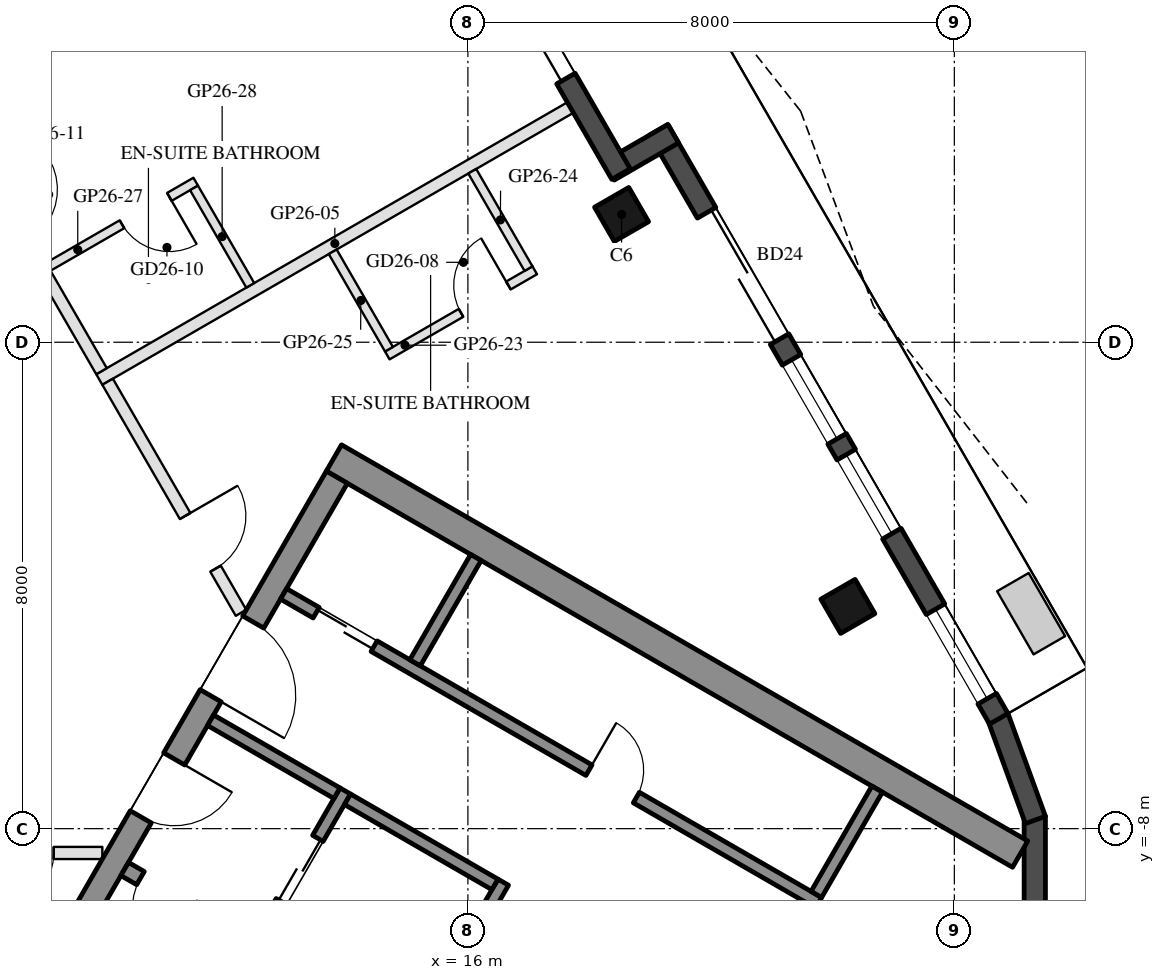
"""IFC4 building model, lengths in metres.
Left out: names, types, materials, properties, quantities, classifications, styles, units other than length and angle.
Written with IfcOpenShell. Run it as: python <this file> out.ifc"""

import sys

from ifc_helpers import new_model, si_unit, direction, frame, frame_2d, origin, origin_2d, place, context, subcontext, project, spatial, rectangle, hollow_rectangle, extrude, boolean, halfspace, element, fill, save


model = new_model("IFC4")
c1 = context("Model", 3, precision=1e-05, world=origin(), true_north=direction((0.0, 1.0)))
c2 = subcontext(c1, "Body", "Model", "MODEL_VIEW")
j1 = project(units=[si_unit("LENGTHUNIT", "METRE"), si_unit("PLANEANGLEUNIT", "RADIAN")], contexts=[c1])
p1 = place(None, origin())
s1 = spatial("IfcSite", under=j1, at=p1, CompositionType="ELEMENT")
p2 = place(p1, origin())
s2 = spatial("IfcBuilding", under=s1, at=p2, CompositionType="ELEMENT")
p3 = place(p2, frame((0.0, 0.0, 272.6)))
s3 = spatial("IfcBuildingStorey", under=s2, at=p3, CompositionType="ELEMENT", Elevation=272.6)
p4 = place(p3, frame((22.249, -4.345, 0.0), z_axis=(0.0, 0.0, 1.0), x_axis=(-0.5, 0.866025403784, 0.0)))
e1 = element("IfcColumn", 1, at=p4, inside=s3, PredefinedType="COLUMN", context=c2, shape_type="SweptSolid", body=[
    boolean("DIFFERENCE", extrude(hollow_rectangle(XDim=0.65, YDim=0.65, WallThickness=0.03, at=origin_2d()), origin(), (0.0, 0.0, 1.0), 3.7), halfspace(frame((0.0, 0.0, 3.653), z_axis=(0.0, 0.0, 1.0), x_axis=(1.0, 0.0, 0.0)), False)),
])
p5 = place(p3, frame((18.527, 2.102, 0.0), z_axis=(0.0, 0.0, 1.0), x_axis=(-0.5, 0.866025403784, 0.0)))
e2 = element("IfcColumn", 2, at=p5, inside=s3, PredefinedType="COLUMN", context=c2, shape_type="SweptSolid", body=[
    boolean("DIFFERENCE", extrude(hollow_rectangle(XDim=0.65, YDim=0.65, WallThickness=0.03, at=origin_2d()), origin(), (0.0, 0.0, 1.0), 3.7), halfspace(frame((0.0, 0.0, 3.66), z_axis=(0.0, 0.0, 1.0), x_axis=(1.0, 0.0, 0.0)), False)),
])
p6 = place(p3, frame((25.323, -9.597, 0.0), z_axis=(0.0, 0.0, 1.0), x_axis=(0.0, 1.0, 0.0)))
e3 = element("IfcWall", 3, at=p6, inside=s3, PredefinedType="SOLIDWALL", context=c2, shape_type="SweptSolid", body=[
    extrude(rectangle(XDim=1.8, YDim=0.35, at=frame_2d((0.9, 0.0))), origin(), (0.0, 0.0, 1.0), 3.55),
])
p7 = place(p3, frame((25.333, -7.857, 0.0), z_axis=(0.0, 0.0, 1.0), x_axis=(-0.34206975284, 0.939674562916, 0.0)))
e4 = element("IfcWall", 4, at=p7, inside=s3, PredefinedType="SOLIDWALL", context=c2, shape_type="SweptSolid", body=[
    extrude(rectangle(XDim=1.8, YDim=0.35, at=frame_2d((0.9, 0.0))), origin(), (0.0, 0.0, 1.0), 3.55),
])
p8 = place(p3, frame((24.731, -6.193, 0.0), z_axis=(0.0, 0.0, 1.0), x_axis=(-0.500007749075, 0.866020929808, 0.0)))
e5 = element("IfcWall", 5, at=p8, inside=s3, PredefinedType="SOLIDWALL", context=c2, shape_type="SweptSolid", body=[
    extrude(rectangle(XDim=11.185, YDim=0.35, at=frame_2d((5.593, 0.0))), origin(), (0.0, 0.0, 1.0), 3.55),
])
p9 = place(p8, frame((0.381, 0.0, 0.3)))
e6 = element("IfcOpeningElement", 6, at=p9, cuts=e5, PredefinedType="OPENING", context=c2, shape_type="SweptSolid", body=[
    extrude(rectangle(XDim=1.7, YDim=2.65, at=frame_2d((0.85, 1.325))), frame((0.0, 0.185, 0.0), z_axis=(0.0, -1.0, 0.0), x_axis=(1.0, 0.0, 0.0)), (0.0, 0.0, 1.0), 0.37),
])
p10 = place(p8, frame((7.21, 0.0, 0.0)))
e7 = element("IfcOpeningElement", 7, at=p10, cuts=e5, PredefinedType="OPENING", context=c2, shape_type="SweptSolid", body=[
    extrude(rectangle(XDim=2.4, YDim=2.4, at=frame_2d((1.2, 1.2))), frame((0.0, 0.185, 0.0), z_axis=(0.0, -1.0, 0.0), x_axis=(1.0, 0.0, 0.0)), (0.0, 0.0, 1.0), 0.37),
])
p11 = place(p8, frame((3.517, 0.0, 0.3)))
e8 = element("IfcOpeningElement", 8, at=p11, cuts=e5, PredefinedType="OPENING", context=c2, shape_type="SweptSolid", body=[
    extrude(rectangle(XDim=1.5, YDim=2.65, at=frame_2d((0.75, 1.325))), frame((0.0, 0.185, 0.0), z_axis=(0.0, -1.0, 0.0), x_axis=(1.0, 0.0, 0.0)), (0.0, 0.0, 1.0), 0.37),
])
p12 = place(p8, frame((5.317, 0.0, 0.3)))
e9 = element("IfcOpeningElement", 9, at=p12, cuts=e5, PredefinedType="OPENING", context=c2, shape_type="SweptSolid", body=[
    extrude(rectangle(XDim=1.5, YDim=2.65, at=frame_2d((0.75, 1.325))), frame((0.0, 0.185, 0.0), z_axis=(0.0, -1.0, 0.0), x_axis=(1.0, 0.0, 0.0)), (0.0, 0.0, 1.0), 0.37),
])
p13 = place(p3, frame((19.377, 3.429, 0.0), z_axis=(0.0, 0.0, 1.0), x_axis=(-0.866092288191, -0.499884134912, 0.0)))
e10 = element("IfcWall", 10, at=p13, inside=s3, PredefinedType="SOLIDWALL", context=c2, shape_type="SweptSolid", body=[
    extrude(rectangle(XDim=1.22, YDim=0.35, at=frame_2d((0.61, 0.0))), origin(), (0.0, 0.0, 1.0), 3.55),
])
p14 = place(p3, frame((18.519, 2.766, 0.0), z_axis=(0.0, 0.0, 1.0), x_axis=(-0.499995993298, 0.866027717042, 0.0)))
e11 = element("IfcWall", 11, at=p14, inside=s3, PredefinedType="SOLIDWALL", context=c2, shape_type="SweptSolid", body=[
    extrude(rectangle(XDim=6.284, YDim=0.35, at=frame_2d((3.142, 0.0))), origin(), (0.0, 0.0, 1.0), 3.55),
])
p15 = place(p14, frame((1.813, 0.0, 0.0)))
e12 = element("IfcOpeningElement", 12, at=p15, cuts=e11, PredefinedType="OPENING", context=c2, shape_type="SweptSolid", body=[
    extrude(rectangle(XDim=2.4, YDim=2.4, at=frame_2d((1.2, 1.2))), frame((0.0, 0.185, 0.0), z_axis=(0.0, -1.0, 0.0), x_axis=(1.0, 0.0, 0.0)), (0.0, 0.0, 1.0), 0.37),
])
p16 = place(p14, frame((4.513, 0.0, 0.3)))
e13 = element("IfcOpeningElement", 13, at=p16, cuts=e11, PredefinedType="OPENING", context=c2, shape_type="SweptSolid", body=[
    extrude(rectangle(XDim=1.4, YDim=2.65, at=frame_2d((0.7, 1.325))), frame((0.0, 0.185, 0.0), z_axis=(0.0, -1.0, 0.0), x_axis=(1.0, 0.0, 0.0)), (0.0, 0.0, 1.0), 0.37),
])
p17 = place(p3, frame((13.797, -1.903, 0.0), z_axis=(0.0, 0.0, 1.0), x_axis=(0.866022106474, -0.500005711065, 0.0)))
e14 = element("IfcWall", 14, at=p17, inside=s3, PredefinedType="SHEAR", context=c2, shape_type="SweptSolid", body=[
    extrude(rectangle(XDim=13.031, YDim=0.5, at=frame_2d((6.516, 0.0))), origin(), (0.0, 0.0, 1.0), 3.5),
])
p18 = place(p3, frame((8.845, -10.88, 0.0), z_axis=(0.0, 0.0, 1.0), x_axis=(0.500004234368, 0.866022959057, 0.0)))
e15 = element("IfcWall", 15, at=p18, inside=s3, PredefinedType="SHEAR", context=c2, shape_type="SweptSolid", body=[
    extrude(rectangle(XDim=10.0, YDim=0.4, at=frame_2d((5.0, 0.0))), origin(), (0.0, 0.0, 1.0), 3.5),
])
p19 = place(p18, frame((3.55, 0.0, 0.0)))
e16 = element("IfcOpeningElement", 16, at=p19, cuts=e15, PredefinedType="OPENING", context=c2, shape_type="SweptSolid", body=[
    extrude(rectangle(XDim=1.1, YDim=2.1, at=frame_2d((0.55, 1.05))), frame((0.0, 0.21, 0.0), z_axis=(0.0, -1.0, 0.0), x_axis=(1.0, 0.0, 0.0)), (0.0, 0.0, 1.0), 0.42),
])
p20 = place(p18, frame((5.85, 0.0, 0.0)))
e17 = element("IfcOpeningElement", 17, at=p20, cuts=e15, PredefinedType="OPENING", context=c2, shape_type="SweptSolid", body=[
    extrude(rectangle(XDim=1.4, YDim=2.1, at=frame_2d((0.7, 1.05))), frame((0.0, 0.21, 0.0), z_axis=(0.0, -1.0, 0.0), x_axis=(1.0, 0.0, 0.0)), (0.0, 0.0, 1.0), 0.42),
])
p21 = place(p3, frame((10.356, -8.664, 0.0), z_axis=(0.0, 0.0, 1.0), x_axis=(0.866028629588, -0.499994412703, 0.0)))
e18 = element("IfcWall", 18, at=p21, inside=s3, PredefinedType="SHEAR", context=c2, shape_type="SweptSolid", body=[
    extrude(rectangle(XDim=6.45, YDim=0.25, at=frame_2d((3.225, 0.0))), origin(), (0.0, 0.0, 1.0), 3.5),
])
p22 = place(p21, frame((0.3, 0.0, 0.0)))
e19 = element("IfcOpeningElement", 19, at=p22, cuts=e18, PredefinedType="OPENING", context=c2, shape_type="SweptSolid", body=[
    extrude(rectangle(XDim=1.0, YDim=2.1, at=frame_2d((0.5, 1.05))), frame((0.0, 0.135, 0.0), z_axis=(0.0, -1.0, 0.0), x_axis=(1.0, 0.0, 0.0)), (0.0, 0.0, 1.0), 0.27),
])
p23 = place(p3, frame((15.181, -11.305, 0.0), z_axis=(0.0, 0.0, 1.0), x_axis=(0.49994636267, 0.866056369097, 0.0)))
e20 = element("IfcWall", 20, at=p23, inside=s3, PredefinedType="SHEAR", context=c2, shape_type="SweptSolid", body=[
    extrude(rectangle(XDim=2.8, YDim=0.2, at=frame_2d((1.4, 0.0))), origin(), (0.0, 0.0, 1.0), 3.5),
])
p24 = place(p3, frame((12.583, -9.805, 0.0), z_axis=(0.0, 0.0, 1.0), x_axis=(0.49994636267, 0.866056369097, 0.0)))
e21 = element("IfcWall", 21, at=p24, inside=s3, PredefinedType="SHEAR", context=c2, shape_type="SweptSolid", body=[
    extrude(rectangle(XDim=2.8, YDim=0.2, at=frame_2d((1.4, 0.0))), origin(), (0.0, 0.0, 1.0), 3.5),
])
p25 = place(p24, frame((0.7, 0.0, 0.0)))
e22 = element("IfcOpeningElement", 22, at=p25, cuts=e21, PredefinedType="OPENING", context=c2, shape_type="SweptSolid", body=[
    extrude(rectangle(XDim=1.2, YDim=2.1, at=frame_2d((0.6, 1.05))), frame((0.0, 0.11, 0.0), z_axis=(0.0, -1.0, 0.0), x_axis=(1.0, 0.0, 0.0)), (0.0, 0.0, 1.0), 0.22),
])
p26 = place(p3, frame((11.768, -6.217, 0.0), z_axis=(0.0, 0.0, 1.0), x_axis=(0.866050077142, -0.499957262057, 0.0)))
e23 = element("IfcWall", 23, at=p26, inside=s3, PredefinedType="SHEAR", context=c2, shape_type="SweptSolid", body=[
    extrude(rectangle(XDim=2.4, YDim=0.2, at=frame_2d((1.2, 0.0))), origin(), (0.0, 0.0, 1.0), 3.5),
])
p27 = place(p3, frame((14.02, -7.517, 0.0), z_axis=(0.0, 0.0, 1.0), x_axis=(0.866034573852, -0.49998411664, 0.0)))
e24 = element("IfcWall", 24, at=p27, inside=s3, PredefinedType="SHEAR", context=c2, shape_type="SweptSolid", body=[
    extrude(rectangle(XDim=2.8, YDim=0.2, at=frame_2d((1.4, 0.0))), origin(), (0.0, 0.0, 1.0), 3.5),
])
p28 = place(p3, frame((12.968, -4.138, 0.0), z_axis=(0.0, 0.0, 1.0), x_axis=(0.866028328073, -0.49999493495, 0.0)))
e25 = element("IfcWall", 25, at=p28, inside=s3, PredefinedType="SHEAR", context=c2, shape_type="SweptSolid", body=[
    extrude(rectangle(XDim=10.16, YDim=0.2, at=frame_2d((5.08, 0.0))), origin(), (0.0, 0.0, 1.0), 3.5),
])
p29 = place(p28, frame((0.62, 0.0, 0.0)))
e26 = element("IfcOpeningElement", 26, at=p29, cuts=e25, PredefinedType="OPENING", context=c2, shape_type="SweptSolid", body=[
    extrude(rectangle(XDim=1.1, YDim=2.1, at=frame_2d((0.55, 1.05))), frame((0.0, 0.11, 0.0), z_axis=(0.0, -1.0, 0.0), x_axis=(1.0, 0.0, 0.0)), (0.0, 0.0, 1.0), 0.22),
])
p30 = place(p28, frame((5.8, 0.0, 0.0)))
e27 = element("IfcOpeningElement", 27, at=p30, cuts=e25, PredefinedType="OPENING", context=c2, shape_type="SweptSolid", body=[
    extrude(rectangle(XDim=0.9, YDim=2.1, at=frame_2d((0.45, 1.05))), frame((0.0, 0.11, 0.0), z_axis=(0.0, -1.0, 0.0), x_axis=(1.0, 0.0, 0.0)), (0.0, 0.0, 1.0), 0.22),
])
for number, where, z_axis, x_axis in (
    (28, (15.131, -5.272, 0.0), (0.0, 0.0, 1.0), (0.5, 0.866, 0.0)),
    (29, (21.73, -9.082, 0.0), (0.0, 0.0, 1.0), (0.5, 0.866, 0.0)),
):
    element("IfcWall", number, at=place(p3, frame(where, z_axis=z_axis, x_axis=x_axis)), inside=s3, PredefinedType="SHEAR", context=c2, shape_type="SweptSolid", body=[
        extrude(rectangle(XDim=2.0, YDim=0.2, at=frame_2d((1.0, 0.0))), origin(), (0.0, 0.0, 1.0), 3.5),
    ])
p31 = place(p3, frame((17.685, 3.86, 0.0), z_axis=(0.0, 0.0, 1.0), x_axis=(-0.866026066645, -0.499998851889, 0.0)))
e30 = element("IfcWall", 30, at=p31, inside=s3, PredefinedType="PARTITIONING", context=c2, shape_type="SweptSolid", body=[
    extrude(rectangle(XDim=8.946, YDim=0.2, at=frame_2d((4.473, 0.0))), origin(), (0.0, 0.0, 1.0), 3.1),
])
p32 = place(p3, frame((9.988, -8.4, 0.0), z_axis=(0.0, 0.0, 1.0), x_axis=(-1.0, 0.0, 0.0)))
e31 = element("IfcWall", 31, at=p32, inside=s3, PredefinedType="PARTITIONING", context=c2, shape_type="SweptSolid", body=[
    extrude(rectangle(XDim=3.788, YDim=0.2, at=frame_2d((1.894, 0.0))), origin(), (0.0, 0.0, 1.0), 3.0),
])
p33 = place(p32, frame((0.8, 0.0, 0.0)))
e32 = element("IfcOpeningElement", 32, at=p33, cuts=e31, PredefinedType="OPENING", context=c2, shape_type="SweptSolid", body=[
    extrude(rectangle(XDim=1.0, YDim=2.1, at=frame_2d((0.5, 1.05))), frame((0.0, 0.11, 0.0), z_axis=(0.0, -1.0, 0.0), x_axis=(1.0, 0.0, 0.0)), (0.0, 0.0, 1.0), 0.22),
])
p34 = place(p3, frame((10.075, -0.65, 0.0), z_axis=(0.0, 0.0, 1.0), x_axis=(0.499998569178, -0.866026229868, 0.0)))
e33 = element("IfcWall", 33, at=p34, inside=s3, PredefinedType="PARTITIONING", context=c2, shape_type="SweptSolid", body=[
    extrude(rectangle(XDim=4.388, YDim=0.2, at=frame_2d((2.194, 0.0))), origin(), (0.0, 0.0, 1.0), 3.0),
])
p35 = place(p34, frame((2.55, 0.0, 0.0)))
e34 = element("IfcOpeningElement", 34, at=p35, cuts=e33, PredefinedType="OPENING", context=c2, shape_type="SweptSolid", body=[
    extrude(rectangle(XDim=1.0, YDim=2.1, at=frame_2d((0.5, 1.05))), frame((0.0, 0.11, 0.0), z_axis=(0.0, -1.0, 0.0), x_axis=(1.0, 0.0, 0.0)), (0.0, 0.0, 1.0), 0.22),
])
p36 = place(p3, frame((14.674, -0.217, 0.0), z_axis=(0.0, 0.0, 1.0), x_axis=(0.866056369097, 0.49994636267, 0.0)))
e35 = element("IfcWall", 35, at=p36, inside=s3, PredefinedType="PARTITIONING", context=c2, shape_type="SweptSolid", body=[
    extrude(rectangle(XDim=2.8, YDim=0.15, at=frame_2d((1.4, 0.0))), origin(), (0.0, 0.0, 1.0), 3.0),
])
p37 = place(p36, frame((1.4, 0.0, 0.0)))
e36 = element("IfcOpeningElement", 36, at=p37, cuts=e35, PredefinedType="OPENING", context=c2, shape_type="SweptSolid", body=[
    extrude(rectangle(XDim=0.9, YDim=2.1, at=frame_2d((0.45, 1.05))), frame((0.0, 0.085, 0.0), z_axis=(0.0, -1.0, 0.0), x_axis=(1.0, 0.0, 0.0)), (0.0, 0.0, 1.0), 0.17),
])
p38 = place(p3, frame((16.997, 1.211, 0.0), z_axis=(0.0, 0.0, 1.0), x_axis=(-0.500042316284, 0.866000971088, 0.0)))
e37 = element("IfcWall", 37, at=p38, inside=s3, PredefinedType="PARTITIONING", context=c2, shape_type="SweptSolid", body=[
    extrude(rectangle(XDim=1.85, YDim=0.15, at=frame_2d((0.925, 0.0))), origin(), (0.0, 0.0, 1.0), 3.0),
])
p39 = place(p3, frame((14.702, -0.115, 0.0), z_axis=(0.0, 0.0, 1.0), x_axis=(-0.499985172903, 0.866033964044, 0.0)))
e38 = element("IfcWall", 38, at=p39, inside=s3, PredefinedType="PARTITIONING", context=c2, shape_type="SweptSolid", body=[
    extrude(rectangle(XDim=1.85, YDim=0.15, at=frame_2d((0.925, 0.0))), origin(), (0.0, 0.0, 1.0), 3.0),
])
p40 = place(p3, frame((6.476, 5.583, 0.0), z_axis=(0.0, 0.0, 1.0), x_axis=(0.499989243959, -0.866031613699, 0.0)))
e39 = element("IfcWall", 39, at=p40, inside=s3, PredefinedType="PARTITIONING", context=c2, shape_type="SweptSolid", body=[
    extrude(rectangle(XDim=6.997, YDim=0.2, at=frame_2d((3.499, 0.0))), origin(), (0.0, 0.0, 1.0), 3.0),
])
p41 = place(p40, frame((3.547, 0.0, 0.0)))
e40 = element("IfcOpeningElement", 40, at=p41, cuts=e39, PredefinedType="OPENING", context=c2, shape_type="SweptSolid", body=[
    extrude(rectangle(XDim=1.0, YDim=2.1, at=frame_2d((0.5, 1.05))), frame((0.0, 0.11, 0.0), z_axis=(0.0, -1.0, 0.0), x_axis=(1.0, 0.0, 0.0)), (0.0, 0.0, 1.0), 0.22),
])
p42 = place(p3, frame((11.524, 2.641, 0.0), z_axis=(0.0, 0.0, 1.0), x_axis=(-0.866018616679, -0.500011755427, 0.0)))
e41 = element("IfcWall", 41, at=p42, inside=s3, PredefinedType="PARTITIONING", context=c2, shape_type="SweptSolid", body=[
    extrude(rectangle(XDim=2.8, YDim=0.15, at=frame_2d((1.4, 0.0))), origin(), (0.0, 0.0, 1.0), 3.55),
])
p43 = place(p42, frame((0.5, 0.0, 0.0)))
e42 = element("IfcOpeningElement", 42, at=p43, cuts=e41, PredefinedType="OPENING", context=c2, shape_type="SweptSolid", body=[
    extrude(rectangle(XDim=0.9, YDim=2.1, at=frame_2d((0.45, 1.05))), frame((0.0, 0.085, 0.0), z_axis=(0.0, -1.0, 0.0), x_axis=(1.0, 0.0, 0.0)), (0.0, 0.0, 1.0), 0.17),
])
p44 = place(p3, frame((12.421, 0.936, 0.0), z_axis=(0.0, 0.0, 1.0), x_axis=(-0.500042316284, 0.866000971088, 0.0)))
e43 = element("IfcWall", 43, at=p44, inside=s3, PredefinedType="PARTITIONING", context=c2, shape_type="SweptSolid", body=[
    extrude(rectangle(XDim=1.85, YDim=0.15, at=frame_2d((0.925, 0.0))), origin(), (0.0, 0.0, 1.0), 3.0),
])
p45 = place(p9, origin())
e44 = element("IfcWindow", 44, at=p45, inside=s3, PartitioningType="SINGLE_PANEL", PredefinedType="WINDOW", context=c2, shape_type="SweptSolid", body=[
    extrude(rectangle(XDim=1.7, YDim=2.65, at=frame_2d((0.85, 1.325))), frame((0.0, 0.03, 0.0), z_axis=(0.0, -1.0, 0.0), x_axis=(1.0, 0.0, 0.0)), (0.0, 0.0, 1.0), 0.06),
])
fill(e6, e44)
p46 = place(p10, frame((2.4, 0.0, 0.0), z_axis=(0.0, 0.0, 1.0), x_axis=(-1.0, 0.0, 0.0)))
e45 = element("IfcDoor", 45, at=p46, inside=s3, OperationType="SLIDING_TO_LEFT", PredefinedType="DOOR", context=c2, shape_type="SweptSolid", body=[
    extrude(rectangle(XDim=2.4, YDim=2.4, at=frame_2d((1.2, 1.2))), frame((0.0, 0.025, 0.0), z_axis=(0.0, -1.0, 0.0), x_axis=(1.0, 0.0, 0.0)), (0.0, 0.0, 1.0), 0.05),
])
fill(e7, e45)
p47 = place(p11, origin())
e46 = element("IfcWindow", 46, at=p47, inside=s3, PartitioningType="SINGLE_PANEL", PredefinedType="WINDOW", context=c2, shape_type="SweptSolid", body=[
    extrude(rectangle(XDim=1.5, YDim=2.65, at=frame_2d((0.75, 1.325))), frame((0.0, 0.03, 0.0), z_axis=(0.0, -1.0, 0.0), x_axis=(1.0, 0.0, 0.0)), (0.0, 0.0, 1.0), 0.06),
])
fill(e8, e46)
p48 = place(p12, origin())
e47 = element("IfcWindow", 47, at=p48, inside=s3, PartitioningType="SINGLE_PANEL", PredefinedType="WINDOW", context=c2, shape_type="SweptSolid", body=[
    extrude(rectangle(XDim=1.5, YDim=2.65, at=frame_2d((0.75, 1.325))), frame((0.0, 0.03, 0.0), z_axis=(0.0, -1.0, 0.0), x_axis=(1.0, 0.0, 0.0)), (0.0, 0.0, 1.0), 0.06),
])
fill(e9, e47)
p49 = place(p15, frame((2.4, 0.0, 0.0), z_axis=(0.0, 0.0, 1.0), x_axis=(-1.0, 0.0, 0.0)))
e48 = element("IfcDoor", 48, at=p49, inside=s3, OperationType="SLIDING_TO_LEFT", PredefinedType="DOOR", context=c2, shape_type="SweptSolid", body=[
    extrude(rectangle(XDim=2.4, YDim=2.4, at=frame_2d((1.2, 1.2))), frame((0.0, 0.025, 0.0), z_axis=(0.0, -1.0, 0.0), x_axis=(1.0, 0.0, 0.0)), (0.0, 0.0, 1.0), 0.05),
])
fill(e12, e48)
p50 = place(p25, origin())
e49 = element("IfcDoor", 49, at=p50, inside=s3, OperationType="DOUBLE_DOOR_SLIDING", PredefinedType="DOOR", context=c2, shape_type="SweptSolid", body=[
    extrude(rectangle(XDim=1.2, YDim=2.1, at=frame_2d((0.6, 1.05))), frame((0.0, 0.025, 0.0), z_axis=(0.0, -1.0, 0.0), x_axis=(1.0, 0.0, 0.0)), (0.0, 0.0, 1.0), 0.05),
])
fill(e22, e49)
p51 = place(p29, origin())
e50 = element("IfcDoor", 50, at=p51, inside=s3, OperationType="DOUBLE_DOOR_SLIDING", PredefinedType="DOOR", context=c2, shape_type="SweptSolid", body=[
    extrude(rectangle(XDim=1.1, YDim=2.1, at=frame_2d((0.55, 1.05))), frame((0.0, 0.025, 0.0), z_axis=(0.0, -1.0, 0.0), x_axis=(1.0, 0.0, 0.0)), (0.0, 0.0, 1.0), 0.05),
])
fill(e26, e50)
p52 = place(p30, origin())
e51 = element("IfcDoor", 51, at=p52, inside=s3, OperationType="SINGLE_SWING_LEFT", PredefinedType="DOOR", context=c2, shape_type="SweptSolid", body=[
    extrude(rectangle(XDim=0.9, YDim=2.1, at=frame_2d((0.45, 1.05))), frame((0.0, 0.025, 0.0), z_axis=(0.0, -1.0, 0.0), x_axis=(1.0, 0.0, 0.0)), (0.0, 0.0, 1.0), 0.05),
])
fill(e27, e51)
p53 = place(p19, frame((1.1, 0.0, 0.0), z_axis=(0.0, 0.0, 1.0), x_axis=(-1.0, 0.0, 0.0)))
e52 = element("IfcDoor", 52, at=p53, inside=s3, OperationType="SINGLE_SWING_LEFT", PredefinedType="DOOR", context=c2, shape_type="SweptSolid", body=[
    extrude(rectangle(XDim=1.1, YDim=2.1, at=frame_2d((0.55, 1.05))), frame((0.0, 0.025, 0.0), z_axis=(0.0, -1.0, 0.0), x_axis=(1.0, 0.0, 0.0)), (0.0, 0.0, 1.0), 0.05),
])
fill(e16, e52)
p54 = place(p20, frame((1.4, 0.0, 0.0), z_axis=(0.0, 0.0, 1.0), x_axis=(-1.0, 0.0, 0.0)))
e53 = element("IfcDoor", 53, at=p54, inside=s3, OperationType="DOUBLE_DOOR_SINGLE_SWING", PredefinedType="DOOR", context=c2, shape_type="SweptSolid", body=[
    extrude(rectangle(XDim=1.4, YDim=2.1, at=frame_2d((0.7, 1.05))), frame((0.0, 0.025, 0.0), z_axis=(0.0, -1.0, 0.0), x_axis=(1.0, 0.0, 0.0)), (0.0, 0.0, 1.0), 0.05),
])
fill(e17, e53)
p55 = place(p22, frame((1.0, 0.0, 0.0), z_axis=(0.0, 0.0, 1.0), x_axis=(-1.0, 0.0, 0.0)))
e54 = element("IfcDoor", 54, at=p55, inside=s3, OperationType="SINGLE_SWING_LEFT", PredefinedType="DOOR", context=c2, shape_type="SweptSolid", body=[
    extrude(rectangle(XDim=1.0, YDim=2.1, at=frame_2d((0.5, 1.05))), frame((0.0, 0.025, 0.0), z_axis=(0.0, -1.0, 0.0), x_axis=(1.0, 0.0, 0.0)), (0.0, 0.0, 1.0), 0.05),
])
fill(e19, e54)
p56 = place(p33, origin())
e55 = element("IfcDoor", 55, at=p56, inside=s3, OperationType="SINGLE_SWING_RIGHT", PredefinedType="DOOR", context=c2, shape_type="SweptSolid", body=[
    extrude(rectangle(XDim=1.0, YDim=2.1, at=frame_2d((0.5, 1.05))), frame((0.0, 0.025, 0.0), z_axis=(0.0, -1.0, 0.0), x_axis=(1.0, 0.0, 0.0)), (0.0, 0.0, 1.0), 0.05),
])
fill(e32, e55)
p57 = place(p37, origin())
e56 = element("IfcDoor", 56, at=p57, inside=s3, OperationType="SINGLE_SWING_RIGHT", PredefinedType="DOOR", context=c2, shape_type="SweptSolid", body=[
    extrude(rectangle(XDim=0.9, YDim=2.1, at=frame_2d((0.45, 1.05))), frame((0.0, 0.025, 0.0), z_axis=(0.0, -1.0, 0.0), x_axis=(1.0, 0.0, 0.0)), (0.0, 0.0, 1.0), 0.05),
])
fill(e36, e56)
p58 = place(p35, origin())
e57 = element("IfcDoor", 57, at=p58, inside=s3, OperationType="SINGLE_SWING_LEFT", PredefinedType="DOOR", context=c2, shape_type="SweptSolid", body=[
    extrude(rectangle(XDim=1.0, YDim=2.1, at=frame_2d((0.5, 1.05))), frame((0.0, 0.025, 0.0), z_axis=(0.0, -1.0, 0.0), x_axis=(1.0, 0.0, 0.0)), (0.0, 0.0, 1.0), 0.05),
])
fill(e34, e57)
p59 = place(p43, origin())
e58 = element("IfcDoor", 58, at=p59, inside=s3, OperationType="SINGLE_SWING_LEFT", PredefinedType="DOOR", context=c2, shape_type="SweptSolid", body=[
    extrude(rectangle(XDim=0.9, YDim=2.1, at=frame_2d((0.45, 1.05))), frame((0.0, 0.025, 0.0), z_axis=(0.0, -1.0, 0.0), x_axis=(1.0, 0.0, 0.0)), (0.0, 0.0, 1.0), 0.05),
])
fill(e42, e58)
save(model, sys.argv[1])
